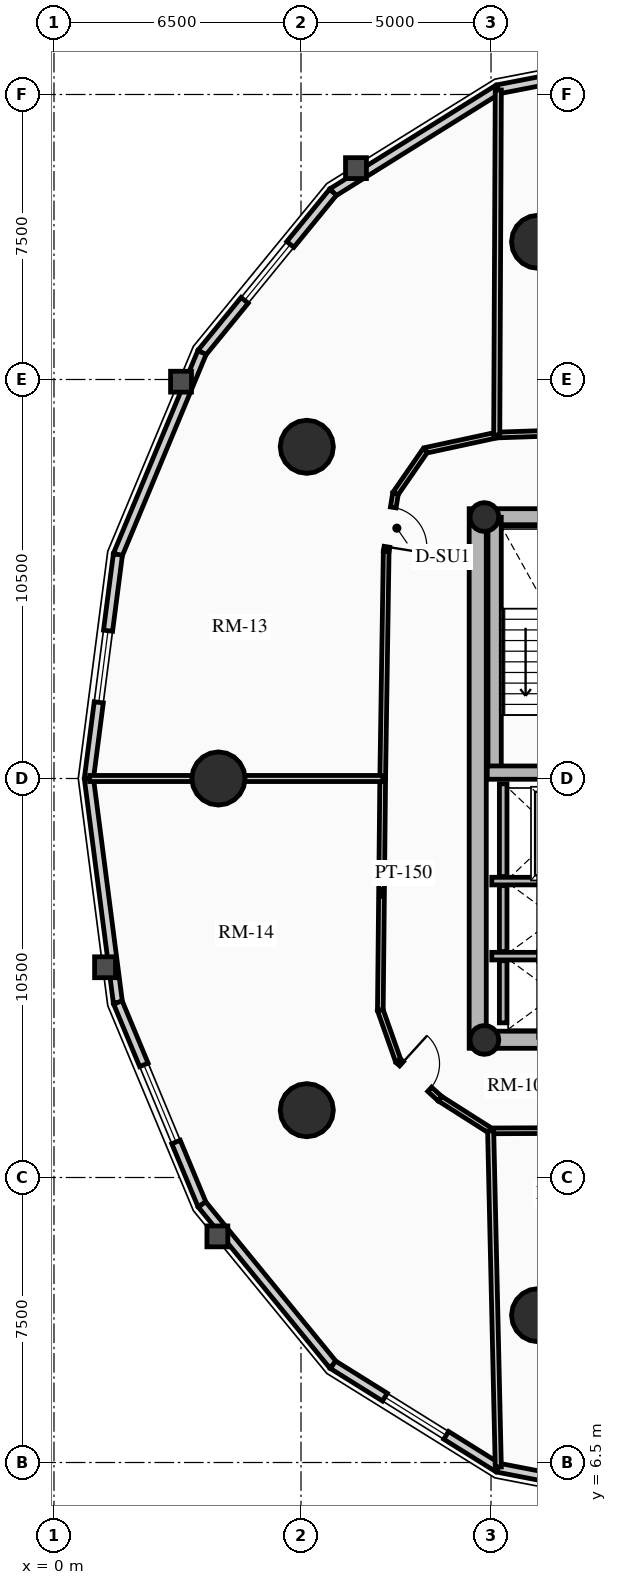
"""IFC4 building model, lengths in metres.
Left out: names, types, materials, properties, quantities, classifications, styles, units other than length and angle.
Written with IfcOpenShell. Run it as: python <this file> out.ifc"""

import sys

from ifc_helpers import new_model, si_unit, direction, frame, frame_2d, origin, origin_2d, place, context, subcontext, project, spatial, rectangle, circle, hollow_circle, extrude, source, transform, mapped, element, fill, save


model = new_model("IFC4")
c1 = context("Model", 3, precision=1e-05, world=origin(), true_north=direction((0.0, 1.0)))
c2 = subcontext(c1, "Body", "Model", "MODEL_VIEW")
j1 = project(units=[si_unit("LENGTHUNIT", "METRE"), si_unit("PLANEANGLEUNIT", "RADIAN")], contexts=[c1])
p1 = place(None, origin())
s1 = spatial("IfcSite", under=j1, at=p1, CompositionType="ELEMENT")
p2 = place(p1, origin())
s2 = spatial("IfcBuilding", under=s1, at=p2, CompositionType="ELEMENT")
p3 = place(p2, frame((0.0, 0.0, 136.6)))
s3 = spatial("IfcBuildingStorey", under=s2, at=p3, CompositionType="ELEMENT", Elevation=136.6)
p4 = place(p3, frame((11.15, 17.4, 0.0), z_axis=(0.0, 0.0, 1.0), x_axis=(0.0, 1.0, 0.0)))
e1 = element("IfcWall", 1, at=p4, inside=s3, PredefinedType="SHEAR", context=c2, shape_type="SweptSolid", body=[
    extrude(rectangle(XDim=14.2, YDim=0.45, at=frame_2d((7.1, 0.0))), origin(), (0.0, 0.0, 1.0), 3.72),
])
p5 = place(p3, frame((11.15, 17.625, 0.0), z_axis=(0.0, 0.0, 1.0), x_axis=(1.0, 0.0, 0.0)))
e2 = element("IfcWall", 2, at=p5, inside=s3, PredefinedType="SHEAR", context=c2, shape_type="SweptSolid", body=[
    extrude(rectangle(XDim=10.7, YDim=0.45, at=frame_2d((5.35, 0.0))), origin(), (0.0, 0.0, 1.0), 3.72),
])
m1 = source(origin(), c2, "Body", "SweptSolid", [
    extrude(rectangle(XDim=1.5, YDim=2.02, at=frame_2d((0.75, 1.01))), frame((0.0, 0.235, 0.0), z_axis=(0.0, -1.0, 0.0), x_axis=(1.0, 0.0, 0.0)), (0.0, 0.0, 1.0), 0.47),
])
p6 = place(p5, frame((5.45, 0.0, 0.0)))
e3 = element("IfcOpeningElement", 3, at=p6, cuts=e2, PredefinedType="OPENING", context=c2, shape_type="MappedRepresentation", body=[
    mapped(m1, transform((0.0, 0.0, 0.0), x_axis=(1.0, 0.0, 0.0), y_axis=(0.0, 1.0, 0.0), z_axis=(0.0, 0.0, 1.0), scale=1.0)),
])
p7 = place(p3, frame((11.15, 31.375, 0.0), z_axis=(0.0, 0.0, 1.0), x_axis=(1.0, 0.0, 0.0)))
e4 = element("IfcWall", 4, at=p7, inside=s3, PredefinedType="SHEAR", context=c2, shape_type="SweptSolid", body=[
    extrude(rectangle(XDim=10.7, YDim=0.45, at=frame_2d((5.35, 0.0))), origin(), (0.0, 0.0, 1.0), 3.72),
])
p8 = place(p7, frame((4.6, 0.0, 0.0)))
e5 = element("IfcOpeningElement", 5, at=p8, cuts=e4, PredefinedType="OPENING", context=c2, shape_type="MappedRepresentation", body=[
    mapped(m1, transform((0.0, 0.0, 0.0), x_axis=(1.0, 0.0, 0.0), y_axis=(0.0, 1.0, 0.0), z_axis=(0.0, 0.0, 1.0), scale=1.0)),
])
p9 = place(p3, frame((11.595, 24.655, 0.0), z_axis=(0.0, 0.0, 1.0), x_axis=(0.0, 1.0, 0.0)))
e6 = element("IfcWall", 6, at=p9, inside=s3, PredefinedType="SHEAR", context=c2, shape_type="SweptSolid", body=[
    extrude(rectangle(XDim=6.72, YDim=0.35, at=frame_2d((3.36, 0.0))), origin(), (0.0, 0.0, 1.0), 3.72),
])
p10 = place(p3, frame((11.4, 24.655, 0.0), z_axis=(0.0, 0.0, 1.0), x_axis=(1.0, 0.0, 0.0)))
e7 = element("IfcWall", 7, at=p10, inside=s3, PredefinedType="SHEAR", context=c2, shape_type="SweptSolid", body=[
    extrude(rectangle(XDim=3.285, YDim=0.35, at=frame_2d((1.643, 0.0))), origin(), (0.0, 0.0, 1.0), 3.72),
])
for number, where, z_axis, x_axis in (
    (8, (11.325, 17.62, 0.0), (0.0, 0.0, 1.0), (1.0, 0.0, 0.0)),
    (9, (11.325, 31.38, 0.0), (0.0, 0.0, 1.0), (1.0, 0.0, 0.0)),
):
    element("IfcColumn", number, at=place(p3, frame(where, z_axis=z_axis, x_axis=x_axis)), inside=s3, PredefinedType="COLUMN", context=c2, shape_type="SweptSolid", body=[
        extrude(hollow_circle(Radius=0.38, WallThickness=0.032, at=origin_2d()), origin(), (0.0, 0.0, 1.0), 3.72),
    ])
for number, where, z_axis, x_axis in (
    (10, (12.739, 38.623, 0.0), (0.0, 0.0, 1.0), (1.0, 0.0, 0.0)),
    (11, (6.653, 33.229, 0.0), (0.0, 0.0, 1.0), (1.0, 0.0, 0.0)),
    (12, (4.328, 24.5, 0.0), (0.0, 0.0, 1.0), (1.0, 0.0, 0.0)),
    (13, (6.653, 15.771, 0.0), (0.0, 0.0, 1.0), (1.0, 0.0, 0.0)),
    (14, (12.739, 10.377, 0.0), (0.0, 0.0, 1.0), (1.0, 0.0, 0.0)),
):
    element("IfcColumn", number, at=place(p3, frame(where, z_axis=z_axis, x_axis=x_axis)), inside=s3, PredefinedType="USERDEFINED", context=c2, shape_type="SweptSolid", body=[
        extrude(circle(Radius=0.7, at=origin_2d()), origin(), (0.0, 0.0, 1.0), 3.72),
    ])
p11 = place(p3, frame((11.685, 42.637, 0.0), z_axis=(0.0, 0.0, 1.0), x_axis=(0.981723785992, 0.190311344954, 0.0)))
e15 = element("IfcWall", 15, at=p11, inside=s3, PredefinedType="SOLIDWALL", context=c2, shape_type="SweptSolid", body=[
    extrude(rectangle(XDim=4.904, YDim=0.24, at=frame_2d((2.452, 0.0))), origin(), (0.0, 0.0, 1.0), 2.949),
])
m2 = source(origin(), c2, "Body", "SweptSolid", [
    extrude(rectangle(XDim=2.2, YDim=1.35, at=frame_2d((1.1, 0.675))), frame((0.0, 0.13, 0.0), z_axis=(0.0, -1.0, 0.0), x_axis=(1.0, 0.0, 0.0)), (0.0, 0.0, 1.0), 0.26),
])
p12 = place(p11, frame((1.352, 0.0, 0.65)))
e16 = element("IfcOpeningElement", 16, at=p12, cuts=e15, PredefinedType="OPENING", context=c2, shape_type="MappedRepresentation", body=[
    mapped(m2, transform((0.0, 0.0, 0.0), x_axis=(1.0, 0.0, 0.0), y_axis=(0.0, 1.0, 0.0), z_axis=(0.0, 0.0, 1.0), scale=1.0)),
])
p13 = place(p3, frame((7.342, 39.928, 0.0), z_axis=(0.0, 0.0, 1.0), x_axis=(0.848520380187, 0.529162701263, 0.0)))
e17 = element("IfcWall", 17, at=p13, inside=s3, PredefinedType="SOLIDWALL", context=c2, shape_type="SweptSolid", body=[
    extrude(rectangle(XDim=5.119, YDim=0.24, at=frame_2d((2.56, 0.0))), origin(), (0.0, 0.0, 1.0), 2.949),
])
p14 = place(p3, frame((3.895, 35.709, 0.0), z_axis=(0.0, 0.0, 1.0), x_axis=(0.632700781152, 0.77439635945, 0.0)))
e18 = element("IfcWall", 18, at=p14, inside=s3, PredefinedType="SOLIDWALL", context=c2, shape_type="SweptSolid", body=[
    extrude(rectangle(XDim=5.448, YDim=0.24, at=frame_2d((2.724, 0.0))), origin(), (0.0, 0.0, 1.0), 2.949),
])
m3 = source(origin(), c2, "Body", "SweptSolid", [
    extrude(rectangle(XDim=1.9, YDim=1.35, at=frame_2d((0.95, 0.675))), frame((0.0, 0.13, 0.0), z_axis=(0.0, -1.0, 0.0), x_axis=(1.0, 0.0, 0.0)), (0.0, 0.0, 1.0), 0.26),
])
p15 = place(p14, frame((1.774, 0.0, 0.65)))
e19 = element("IfcOpeningElement", 19, at=p15, cuts=e18, PredefinedType="OPENING", context=c2, shape_type="MappedRepresentation", body=[
    mapped(m3, transform((0.0, 0.0, 0.0), x_axis=(1.0, 0.0, 0.0), y_axis=(0.0, 1.0, 0.0), z_axis=(0.0, 0.0, 1.0), scale=1.0)),
])
p16 = place(p3, frame((1.682, 30.393, 0.0), z_axis=(0.0, 0.0, 1.0), x_axis=(0.384344417632, 0.923189779317, 0.0)))
e20 = element("IfcWall", 20, at=p16, inside=s3, PredefinedType="SOLIDWALL", context=c2, shape_type="SweptSolid", body=[
    extrude(rectangle(XDim=5.758, YDim=0.24, at=frame_2d((2.879, 0.0))), origin(), (0.0, 0.0, 1.0), 2.949),
])
p17 = place(p3, frame((0.919, 24.5, 0.0), z_axis=(0.0, 0.0, 1.0), x_axis=(0.128351991996, 0.991728675672, 0.0)))
e21 = element("IfcWall", 21, at=p17, inside=s3, PredefinedType="SOLIDWALL", context=c2, shape_type="SweptSolid", body=[
    extrude(rectangle(XDim=5.942, YDim=0.24, at=frame_2d((2.971, 0.0))), origin(), (0.0, 0.0, 1.0), 2.949),
])
p18 = place(p17, frame((2.021, 0.0, 0.65)))
e22 = element("IfcOpeningElement", 22, at=p18, cuts=e21, PredefinedType="OPENING", context=c2, shape_type="MappedRepresentation", body=[
    mapped(m3, transform((0.0, 0.0, 0.0), x_axis=(1.0, 0.0, 0.0), y_axis=(0.0, 1.0, 0.0), z_axis=(0.0, 0.0, 1.0), scale=1.0)),
])
p19 = place(p3, frame((1.682, 18.607, 0.0), z_axis=(0.0, 0.0, 1.0), x_axis=(-0.128351991996, 0.991728675672, 0.0)))
e23 = element("IfcWall", 23, at=p19, inside=s3, PredefinedType="SOLIDWALL", context=c2, shape_type="SweptSolid", body=[
    extrude(rectangle(XDim=5.942, YDim=0.24, at=frame_2d((2.971, 0.0))), origin(), (0.0, 0.0, 1.0), 2.949),
])
p20 = place(p3, frame((3.895, 13.291, 0.0), z_axis=(0.0, 0.0, 1.0), x_axis=(-0.384344417632, 0.923189779317, 0.0)))
e24 = element("IfcWall", 24, at=p20, inside=s3, PredefinedType="SOLIDWALL", context=c2, shape_type="SweptSolid", body=[
    extrude(rectangle(XDim=5.758, YDim=0.24, at=frame_2d((2.879, 0.0))), origin(), (0.0, 0.0, 1.0), 2.949),
])
p21 = place(p20, frame((1.779, 0.0, 0.65)))
e25 = element("IfcOpeningElement", 25, at=p21, cuts=e24, PredefinedType="OPENING", context=c2, shape_type="MappedRepresentation", body=[
    mapped(m2, transform((0.0, 0.0, 0.0), x_axis=(1.0, 0.0, 0.0), y_axis=(0.0, 1.0, 0.0), z_axis=(0.0, 0.0, 1.0), scale=1.0)),
])
p22 = place(p3, frame((7.342, 9.072, 0.0), z_axis=(0.0, 0.0, 1.0), x_axis=(-0.632700781152, 0.77439635945, 0.0)))
e26 = element("IfcWall", 26, at=p22, inside=s3, PredefinedType="SOLIDWALL", context=c2, shape_type="SweptSolid", body=[
    extrude(rectangle(XDim=5.448, YDim=0.24, at=frame_2d((2.724, 0.0))), origin(), (0.0, 0.0, 1.0), 2.949),
])
p23 = place(p3, frame((11.685, 6.363, 0.0), z_axis=(0.0, 0.0, 1.0), x_axis=(-0.848520380187, 0.529162701263, 0.0)))
e27 = element("IfcWall", 27, at=p23, inside=s3, PredefinedType="SOLIDWALL", context=c2, shape_type="SweptSolid", body=[
    extrude(rectangle(XDim=5.119, YDim=0.24, at=frame_2d((2.56, 0.0))), origin(), (0.0, 0.0, 1.0), 2.949),
])
p24 = place(p23, frame((1.609, 0.0, 0.65)))
e28 = element("IfcOpeningElement", 28, at=p24, cuts=e27, PredefinedType="OPENING", context=c2, shape_type="MappedRepresentation", body=[
    mapped(m3, transform((0.0, 0.0, 0.0), x_axis=(1.0, 0.0, 0.0), y_axis=(0.0, 1.0, 0.0), z_axis=(0.0, 0.0, 1.0), scale=1.0)),
])
p25 = place(p3, frame((16.5, 5.43, 0.0), z_axis=(0.0, 0.0, 1.0), x_axis=(-0.981723785992, 0.190311344954, 0.0)))
e29 = element("IfcWall", 29, at=p25, inside=s3, PredefinedType="SOLIDWALL", context=c2, shape_type="SweptSolid", body=[
    extrude(rectangle(XDim=4.904, YDim=0.24, at=frame_2d((2.452, 0.0))), origin(), (0.0, 0.0, 1.0), 2.949),
])
p26 = place(p25, frame((1.352, 0.0, 0.65)))
e30 = element("IfcOpeningElement", 30, at=p26, cuts=e29, PredefinedType="OPENING", context=c2, shape_type="MappedRepresentation", body=[
    mapped(m2, transform((0.0, 0.0, 0.0), x_axis=(1.0, 0.0, 0.0), y_axis=(0.0, 1.0, 0.0), z_axis=(0.0, 0.0, 1.0), scale=1.0)),
])
p27 = place(p3, frame((11.52, 21.8, 0.0), z_axis=(0.0, 0.0, 1.0), x_axis=(1.0, 0.0, 0.0)))
e31 = element("IfcWall", 31, at=p27, inside=s3, PredefinedType="SHEAR", context=c2, shape_type="SweptSolid", body=[
    extrude(rectangle(XDim=2.97, YDim=0.2, at=frame_2d((1.485, 0.0))), origin(), (0.0, 0.0, 1.0), 3.72),
])
p28 = place(p3, frame((11.82, 21.92, 0.0), z_axis=(0.0, 0.0, 1.0), x_axis=(0.0, 1.0, 0.0)))
e32 = element("IfcWall", 32, at=p28, inside=s3, PredefinedType="SHEAR", context=c2, shape_type="SweptSolid", body=[
    extrude(rectangle(XDim=2.44, YDim=0.2, at=frame_2d((1.22, 0.0))), origin(), (0.0, 0.0, 1.0), 3.72),
])
p29 = place(p3, frame((11.52, 19.825, 0.0), z_axis=(0.0, 0.0, 1.0), x_axis=(1.0, 0.0, 0.0)))
e33 = element("IfcWall", 33, at=p29, inside=s3, PredefinedType="SHEAR", context=c2, shape_type="SweptSolid", body=[
    extrude(rectangle(XDim=2.97, YDim=0.2, at=frame_2d((1.485, 0.0))), origin(), (0.0, 0.0, 1.0), 3.72),
])
p30 = place(p3, frame((11.82, 19.945, 0.0), z_axis=(0.0, 0.0, 1.0), x_axis=(0.0, 1.0, 0.0)))
e34 = element("IfcWall", 34, at=p30, inside=s3, PredefinedType="SHEAR", context=c2, shape_type="SweptSolid", body=[
    extrude(rectangle(XDim=1.735, YDim=0.2, at=frame_2d((0.867, 0.0))), origin(), (0.0, 0.0, 1.0), 3.72),
])
p31 = place(p3, frame((11.82, 18.07, 0.0), z_axis=(0.0, 0.0, 1.0), x_axis=(0.0, 1.0, 0.0)))
e35 = element("IfcWall", 35, at=p31, inside=s3, PredefinedType="SHEAR", context=c2, shape_type="SweptSolid", body=[
    extrude(rectangle(XDim=1.635, YDim=0.2, at=frame_2d((0.817, 0.0))), origin(), (0.0, 0.0, 1.0), 3.72),
])
p32 = place(p3, frame((18.133, 33.76, 0.0), z_axis=(0.0, 0.0, 1.0), x_axis=(-0.999419643988, -0.034064280574, 0.0)))
e36 = element("IfcWall", 36, at=p32, inside=s3, PredefinedType="PARTITIONING", context=c2, shape_type="SweptSolid", body=[
    extrude(rectangle(XDim=6.486, YDim=0.15, at=frame_2d((3.243, 0.0))), origin(), (0.0, 0.0, 1.0), 2.995),
])
p33 = place(p3, frame((11.65, 33.539, 0.0), z_axis=(0.0, 0.0, 1.0), x_axis=(-0.977535921581, -0.210768882949, 0.0)))
e37 = element("IfcWall", 37, at=p33, inside=s3, PredefinedType="PARTITIONING", context=c2, shape_type="SweptSolid", body=[
    extrude(rectangle(XDim=1.923, YDim=0.15, at=frame_2d((0.961, 0.0))), origin(), (0.0, 0.0, 1.0), 2.995),
])
p34 = place(p3, frame((9.771, 33.133, 0.0), z_axis=(0.0, 0.0, 1.0), x_axis=(-0.568464531016, -0.822707771312, 0.0)))
e38 = element("IfcWall", 38, at=p34, inside=s3, PredefinedType="PARTITIONING", context=c2, shape_type="SweptSolid", body=[
    extrude(rectangle(XDim=1.38, YDim=0.15, at=frame_2d((0.69, 0.0))), origin(), (0.0, 0.0, 1.0), 2.995),
])
p35 = place(p3, frame((8.986, 31.998, 0.0), z_axis=(0.0, 0.0, 1.0), x_axis=(-0.158992972351, -0.98727971454, 0.0)))
e39 = element("IfcWall", 39, at=p35, inside=s3, PredefinedType="PARTITIONING", context=c2, shape_type="SweptSolid", body=[
    extrude(rectangle(XDim=1.539, YDim=0.15, at=frame_2d((0.769, 0.0))), origin(), (0.0, 0.0, 1.0), 2.995),
])
m4 = source(origin(), c2, "Body", "SweptSolid", [
    extrude(rectangle(XDim=1.05, YDim=2.015, at=frame_2d((0.525, 1.007))), frame((0.0, 0.085, 0.0), z_axis=(0.0, -1.0, 0.0), x_axis=(1.0, 0.0, 0.0)), (0.0, 0.0, 1.0), 0.17),
])
p36 = place(p35, frame((0.369, 0.0, 0.0)))
e40 = element("IfcOpeningElement", 40, at=p36, cuts=e39, PredefinedType="OPENING", context=c2, shape_type="MappedRepresentation", body=[
    mapped(m4, transform((0.0, 0.0, 0.0), x_axis=(1.0, 0.0, 0.0), y_axis=(0.0, 1.0, 0.0), z_axis=(0.0, 0.0, 1.0), scale=1.0)),
])
p37 = place(p3, frame((8.742, 30.479, 0.0), z_axis=(0.0, 0.0, 1.0), x_axis=(-0.015351396174, -0.999882160375, 0.0)))
e41 = element("IfcWall", 41, at=p37, inside=s3, PredefinedType="PARTITIONING", context=c2, shape_type="SweptSolid", body=[
    extrude(rectangle(XDim=5.98, YDim=0.15, at=frame_2d((2.99, 0.0))), origin(), (0.0, 0.0, 1.0), 3.425),
])
p38 = place(p3, frame((8.65, 24.5, 0.0), z_axis=(0.0, 0.0, 1.0), x_axis=(-0.010250943023, -0.999947457703, 0.0)))
e42 = element("IfcWall", 42, at=p38, inside=s3, PredefinedType="PARTITIONING", context=c2, shape_type="SweptSolid", body=[
    extrude(rectangle(XDim=6.097, YDim=0.15, at=frame_2d((3.048, 0.0))), origin(), (0.0, 0.0, 1.0), 2.995),
])
p39 = place(p3, frame((8.587, 18.403, 0.0), z_axis=(0.0, 0.0, 1.0), x_axis=(0.333119120686, -0.942884749815, 0.0)))
e43 = element("IfcWall", 43, at=p39, inside=s3, PredefinedType="PARTITIONING", context=c2, shape_type="SweptSolid", body=[
    extrude(rectangle(XDim=1.409, YDim=0.15, at=frame_2d((0.705, 0.0))), origin(), (0.0, 0.0, 1.0), 2.995),
])
p40 = place(p3, frame((9.057, 17.074, 0.0), z_axis=(0.0, 0.0, 1.0), x_axis=(0.739999571423, -0.672607340351, 0.0)))
e44 = element("IfcWall", 44, at=p40, inside=s3, PredefinedType="PARTITIONING", context=c2, shape_type="SweptSolid", body=[
    extrude(rectangle(XDim=1.485, YDim=0.15, at=frame_2d((0.743, 0.0))), origin(), (0.0, 0.0, 1.0), 2.995),
])
m5 = source(origin(), c2, "Body", "SweptSolid", [
    extrude(rectangle(XDim=1.0, YDim=2.015, at=frame_2d((0.5, 1.007))), frame((0.0, 0.085, 0.0), z_axis=(0.0, -1.0, 0.0), x_axis=(1.0, 0.0, 0.0)), (0.0, 0.0, 1.0), 0.17),
])
p41 = place(p40, frame((0.12, 0.0, 0.0)))
e45 = element("IfcOpeningElement", 45, at=p41, cuts=e44, PredefinedType="OPENING", context=c2, shape_type="MappedRepresentation", body=[
    mapped(m5, transform((0.0, 0.0, 0.0), x_axis=(1.0, 0.0, 0.0), y_axis=(0.0, 1.0, 0.0), z_axis=(0.0, 0.0, 1.0), scale=1.0)),
])
p42 = place(p3, frame((10.156, 16.075, 0.0), z_axis=(0.0, 0.0, 1.0), x_axis=(0.843896624713, -0.536505812455, 0.0)))
e46 = element("IfcWall", 46, at=p42, inside=s3, PredefinedType="PARTITIONING", context=c2, shape_type="SweptSolid", body=[
    extrude(rectangle(XDim=1.581, YDim=0.15, at=frame_2d((0.791, 0.0))), origin(), (0.0, 0.0, 1.0), 2.995),
])
p43 = place(p3, frame((11.49, 15.227, 0.0), z_axis=(0.0, 0.0, 1.0), x_axis=(0.999991728046, 0.004067411998, 0.0)))
e47 = element("IfcWall", 47, at=p43, inside=s3, PredefinedType="PARTITIONING", context=c2, shape_type="SweptSolid", body=[
    extrude(rectangle(XDim=3.301, YDim=0.15, at=frame_2d((1.651, 0.0))), origin(), (0.0, 0.0, 1.0), 2.995),
])
p44 = place(p3, frame((11.65, 33.539, 0.0), z_axis=(0.0, 0.0, 1.0), x_axis=(0.00451754022, 0.999989795863, 0.0)))
e48 = element("IfcWall", 48, at=p44, inside=s3, PredefinedType="PARTITIONING", context=c2, shape_type="SweptSolid", body=[
    extrude(rectangle(XDim=9.079, YDim=0.16, at=frame_2d((4.54, 0.0))), origin(), (0.0, 0.0, 1.0), 2.949),
])
p45 = place(p3, frame((8.65, 24.5, 0.0), z_axis=(0.0, 0.0, 1.0), x_axis=(-1.0, 0.0, 0.0)))
e49 = element("IfcWall", 49, at=p45, inside=s3, PredefinedType="PARTITIONING", context=c2, shape_type="SweptSolid", body=[
    extrude(rectangle(XDim=7.711, YDim=0.16, at=frame_2d((3.855, 0.0))), origin(), (0.0, 0.0, 1.0), 2.949),
])
p46 = place(p3, frame((11.49, 15.227, 0.0), z_axis=(0.0, 0.0, 1.0), x_axis=(0.022711375682, -0.999742063442, 0.0)))
e50 = element("IfcWall", 50, at=p46, inside=s3, PredefinedType="PARTITIONING", context=c2, shape_type="SweptSolid", body=[
    extrude(rectangle(XDim=8.847, YDim=0.16, at=frame_2d((4.423, 0.0))), origin(), (0.0, 0.0, 1.0), 2.949),
])
m6 = source(origin(), c2, "Body", "SweptSolid", [
    extrude(rectangle(XDim=1.9, YDim=1.35, at=frame_2d((0.95, 0.675))), frame((0.0, 0.03, 0.0), z_axis=(0.0, -1.0, 0.0), x_axis=(1.0, 0.0, 0.0)), (0.0, 0.0, 1.0), 0.06),
])
p47 = place(p15, origin())
e51 = element("IfcWindow", 51, at=p47, inside=s3, PartitioningType="DOUBLE_PANEL_VERTICAL", PredefinedType="WINDOW", context=c2, shape_type="MappedRepresentation", body=[
    mapped(m6, transform((0.0, 0.0, 0.0), x_axis=(1.0, 0.0, 0.0), y_axis=(0.0, 1.0, 0.0), z_axis=(0.0, 0.0, 1.0), scale=1.0)),
])
fill(e19, e51)
p48 = place(p18, origin())
e52 = element("IfcWindow", 52, at=p48, inside=s3, PartitioningType="DOUBLE_PANEL_VERTICAL", PredefinedType="WINDOW", context=c2, shape_type="MappedRepresentation", body=[
    mapped(m6, transform((0.0, 0.0, 0.0), x_axis=(1.0, 0.0, 0.0), y_axis=(0.0, 1.0, 0.0), z_axis=(0.0, 0.0, 1.0), scale=1.0)),
])
fill(e22, e52)
m7 = source(origin(), c2, "Body", "SweptSolid", [
    extrude(rectangle(XDim=2.2, YDim=1.35, at=frame_2d((1.1, 0.675))), frame((0.0, 0.03, 0.0), z_axis=(0.0, -1.0, 0.0), x_axis=(1.0, 0.0, 0.0)), (0.0, 0.0, 1.0), 0.06),
])
p49 = place(p21, origin())
e53 = element("IfcWindow", 53, at=p49, inside=s3, PartitioningType="DOUBLE_PANEL_VERTICAL", PredefinedType="WINDOW", context=c2, shape_type="MappedRepresentation", body=[
    mapped(m7, transform((0.0, 0.0, 0.0), x_axis=(1.0, 0.0, 0.0), y_axis=(0.0, 1.0, 0.0), z_axis=(0.0, 0.0, 1.0), scale=1.0)),
])
fill(e25, e53)
p50 = place(p24, origin())
e54 = element("IfcWindow", 54, at=p50, inside=s3, PartitioningType="DOUBLE_PANEL_VERTICAL", PredefinedType="WINDOW", context=c2, shape_type="MappedRepresentation", body=[
    mapped(m6, transform((0.0, 0.0, 0.0), x_axis=(1.0, 0.0, 0.0), y_axis=(0.0, 1.0, 0.0), z_axis=(0.0, 0.0, 1.0), scale=1.0)),
])
fill(e28, e54)
m8 = source(origin(), c2, "Body", "SweptSolid", [
    extrude(rectangle(XDim=1.05, YDim=2.015, at=frame_2d((0.525, 1.007))), frame((0.0, 0.025, 0.0), z_axis=(0.0, -1.0, 0.0), x_axis=(1.0, 0.0, 0.0)), (0.0, 0.0, 1.0), 0.05),
])
p51 = place(p36, origin())
e55 = element("IfcDoor", 55, at=p51, inside=s3, OperationType="SINGLE_SWING_RIGHT", PredefinedType="DOOR", context=c2, shape_type="MappedRepresentation", body=[
    mapped(m8, transform((0.0, 0.0, 0.0), x_axis=(1.0, 0.0, 0.0), y_axis=(0.0, 1.0, 0.0), z_axis=(0.0, 0.0, 1.0), scale=1.0)),
])
fill(e40, e55)
m9 = source(origin(), c2, "Body", "SweptSolid", [
    extrude(rectangle(XDim=1.0, YDim=2.015, at=frame_2d((0.5, 1.007))), frame((0.0, 0.025, 0.0), z_axis=(0.0, -1.0, 0.0), x_axis=(1.0, 0.0, 0.0)), (0.0, 0.0, 1.0), 0.05),
])
p52 = place(p41, origin())
e56 = element("IfcDoor", 56, at=p52, inside=s3, OperationType="SINGLE_SWING_LEFT", PredefinedType="DOOR", context=c2, shape_type="MappedRepresentation", body=[
    mapped(m9, transform((0.0, 0.0, 0.0), x_axis=(1.0, 0.0, 0.0), y_axis=(0.0, 1.0, 0.0), z_axis=(0.0, 0.0, 1.0), scale=1.0)),
])
fill(e45, e56)
save(model, sys.argv[1])
